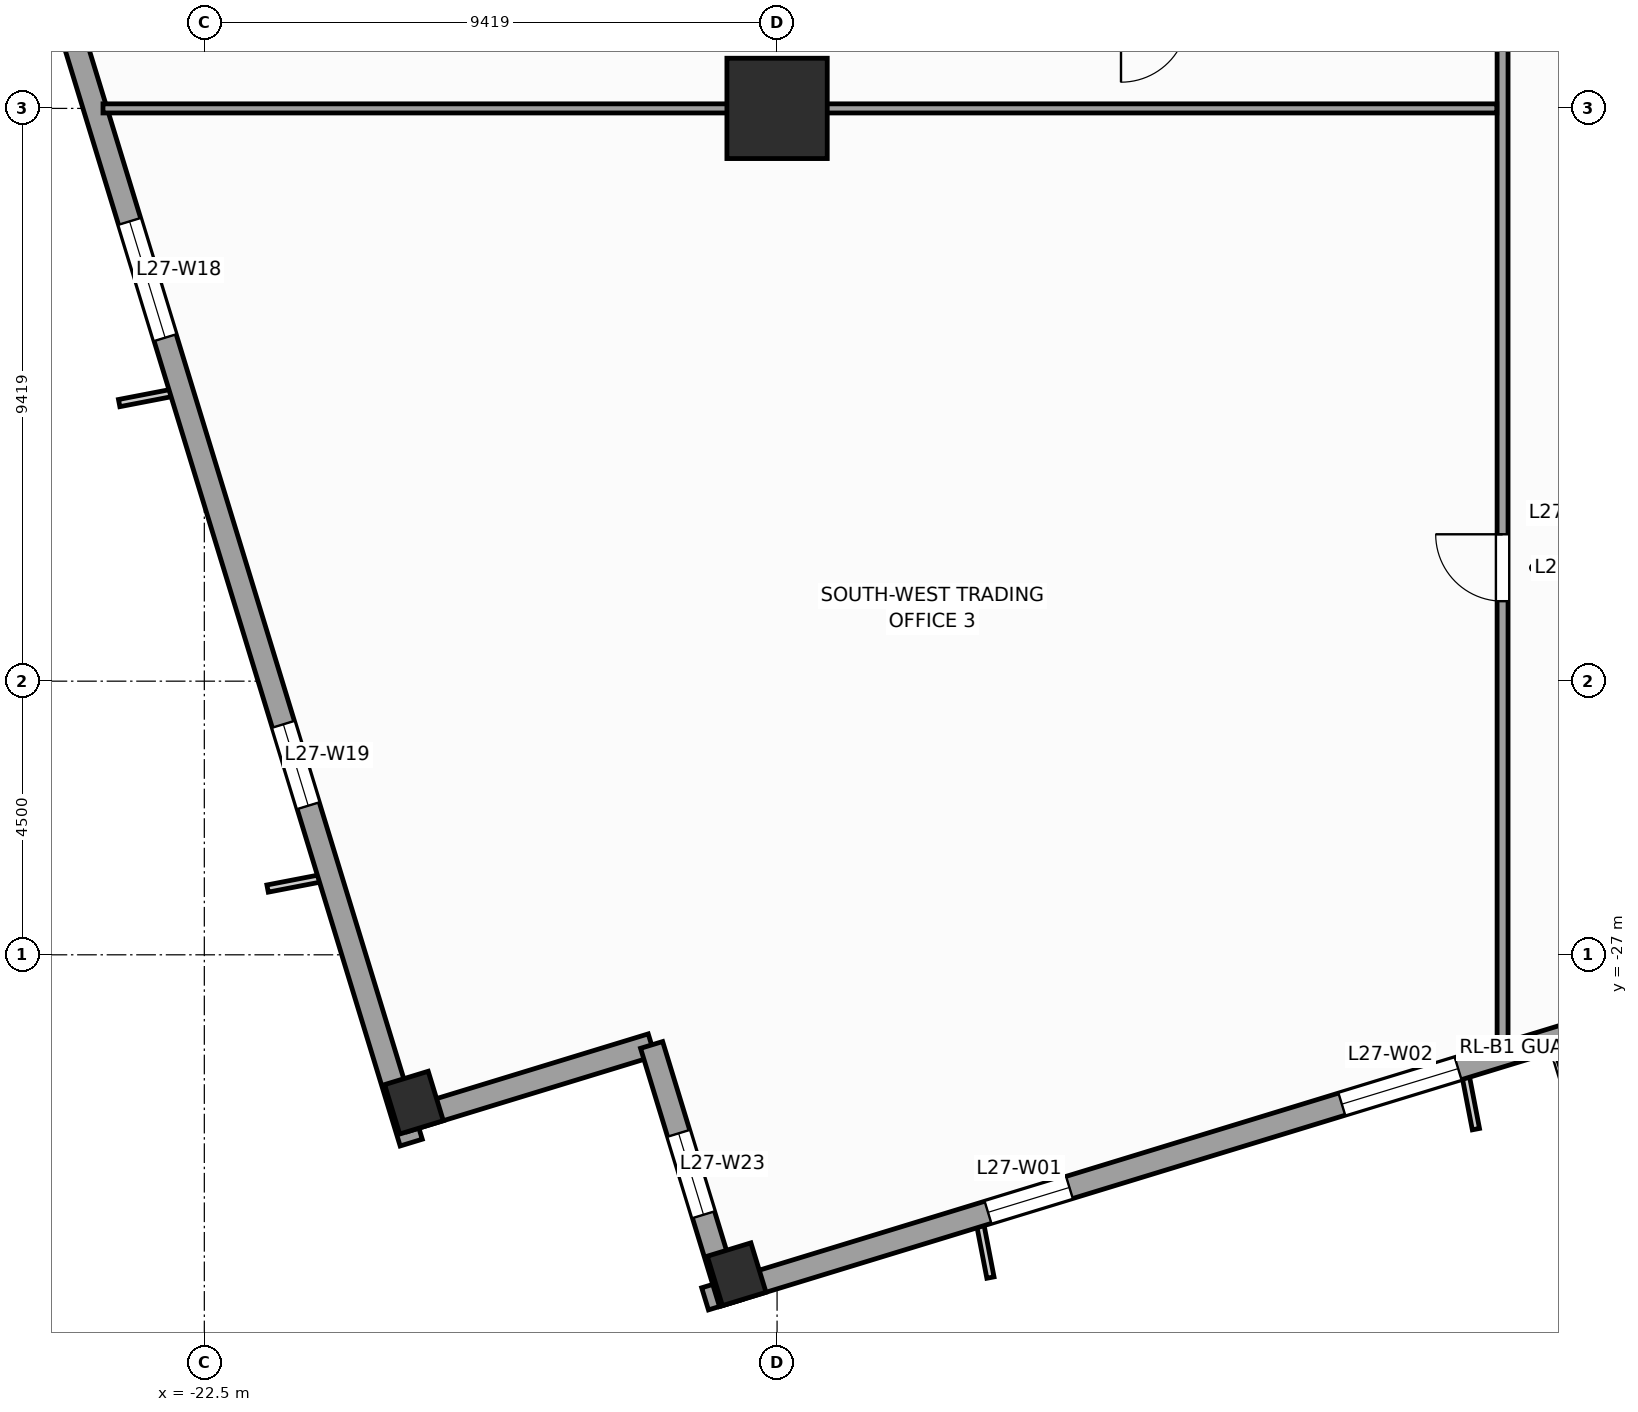
"""IFC4 building model, lengths in metres.
Left out: names, types, materials, properties, quantities, classifications, styles, units other than length and angle.
Written with IfcOpenShell. Run it as: python <this file> out.ifc"""

import sys

from ifc_helpers import new_model, si_unit, direction, frame, frame_2d, origin, origin_2d, place, context, subcontext, project, spatial, rectangle, extrude, source, transform, mapped, element, fill, save


model = new_model("IFC4")
c1 = context("Model", 3, precision=1e-05, world=origin(), true_north=direction((0.0, 1.0)))
c2 = subcontext(c1, "Body", "Model", "MODEL_VIEW")
j1 = project(units=[si_unit("LENGTHUNIT", "METRE"), si_unit("PLANEANGLEUNIT", "RADIAN")], contexts=[c1])
p1 = place(None, origin())
s1 = spatial("IfcSite", under=j1, at=p1, CompositionType="ELEMENT")
p2 = place(p1, origin())
s2 = spatial("IfcBuilding", under=s1, at=p2, CompositionType="ELEMENT")
p3 = place(p2, frame((0.0, 0.0, 115.2)))
s3 = spatial("IfcBuildingStorey", under=s2, at=p3, CompositionType="ELEMENT", Elevation=115.2)
m1 = source(origin(), c2, "Body", "SweptSolid", [
    extrude(rectangle(XDim=1.65, YDim=1.65, at=origin_2d()), origin(), (0.0, 0.0, 1.0), 4.0),
])
p4 = place(p3, frame((-13.081, -13.081, 0.0), z_axis=(0.0, 0.0, 1.0), x_axis=(1.0, 0.0, 0.0)))
e1 = element("IfcColumn", 1, at=p4, inside=s3, PredefinedType="COLUMN", context=c2, shape_type="MappedRepresentation", body=[
    mapped(m1, transform((0.0, 0.0, 0.0), scale=1.0)),
])
m2 = source(origin(), c2, "Body", "SweptSolid", [
    extrude(rectangle(XDim=0.75, YDim=0.85, at=origin_2d()), origin(), (0.0, 0.0, 1.0), 4.0),
])
for number, where, z_axis, x_axis in (
    (2, (-13.746, -32.253, 0.0), (0.0, 0.0, 1.0), (0.956, 0.292, 0.0)),
    (3, (-19.052, -29.431, 0.0), (0.0, 0.0, 1.0), (0.956, 0.292, 0.0)),
):
    element("IfcColumn", number, at=place(p3, frame(where, z_axis=z_axis, x_axis=x_axis)), inside=s3, PredefinedType="COLUMN", context=c2, shape_type="MappedRepresentation", body=[
        mapped(m2, transform((0.0, 0.0, 0.0), scale=1.0)),
    ])
p5 = place(p3, frame((-14.265, -32.658, 0.0), z_axis=(0.0, 0.0, 1.0), x_axis=(0.956304320851, 0.292373127906, 0.0)))
e4 = element("IfcWall", 4, at=p5, inside=s3, PredefinedType="STANDARD", context=c2, shape_type="SweptSolid", body=[
    extrude(rectangle(XDim=46.38, YDim=0.38, at=frame_2d((23.19, 0.0))), origin(), (0.0, 0.0, 1.0), 3.14),
])
p6 = place(p5, frame((17.065, 0.0, 0.0)))
e5 = element("IfcOpeningElement", 5, at=p6, cuts=e4, PredefinedType="OPENING", context=c2, shape_type="SweptSolid", body=[
    extrude(rectangle(XDim=1.05, YDim=2.25, at=frame_2d((0.525, 1.125))), frame((0.0, 0.2, 0.0), z_axis=(0.0, -1.0, 0.0), x_axis=(1.0, 0.0, 0.0)), (0.0, 0.0, 1.0), 0.4),
])
p7 = place(p5, frame((4.865, 0.0, 0.51)))
e6 = element("IfcOpeningElement", 6, at=p7, cuts=e4, PredefinedType="OPENING", context=c2, shape_type="SweptSolid", body=[
    extrude(rectangle(XDim=1.4, YDim=2.4, at=frame_2d((0.7, 1.2))), frame((0.0, 0.2, 0.0), z_axis=(0.0, -1.0, 0.0), x_axis=(1.0, 0.0, 0.0)), (0.0, 0.0, 1.0), 0.4),
])
p8 = place(p5, frame((10.95, 0.0, 0.51)))
e7 = element("IfcOpeningElement", 7, at=p8, cuts=e4, PredefinedType="OPENING", context=c2, shape_type="SweptSolid", body=[
    extrude(rectangle(XDim=2.0, YDim=2.4, at=frame_2d((1.0, 1.2))), frame((0.0, 0.2, 0.0), z_axis=(0.0, -1.0, 0.0), x_axis=(1.0, 0.0, 0.0)), (0.0, 0.0, 1.0), 0.4),
])
p9 = place(p5, frame((20.512, 0.0, 0.51)))
e8 = element("IfcOpeningElement", 8, at=p9, cuts=e4, PredefinedType="OPENING", context=c2, shape_type="SweptSolid", body=[
    extrude(rectangle(XDim=2.0, YDim=2.4, at=frame_2d((1.0, 1.2))), frame((0.0, 0.2, 0.0), z_axis=(0.0, -1.0, 0.0), x_axis=(1.0, 0.0, 0.0)), (0.0, 0.0, 1.0), 0.4),
])
p10 = place(p5, frame((30.538, 0.0, 0.51)))
e9 = element("IfcOpeningElement", 9, at=p10, cuts=e4, PredefinedType="OPENING", context=c2, shape_type="SweptSolid", body=[
    extrude(rectangle(XDim=2.0, YDim=2.4, at=frame_2d((1.0, 1.2))), frame((0.0, 0.2, 0.0), z_axis=(0.0, -1.0, 0.0), x_axis=(1.0, 0.0, 0.0)), (0.0, 0.0, 1.0), 0.4),
])
p11 = place(p5, frame((39.187, 0.0, 0.51)))
e10 = element("IfcOpeningElement", 10, at=p11, cuts=e4, PredefinedType="OPENING", context=c2, shape_type="SweptSolid", body=[
    extrude(rectangle(XDim=1.4, YDim=2.4, at=frame_2d((0.7, 1.2))), frame((0.0, 0.2, 0.0), z_axis=(0.0, -1.0, 0.0), x_axis=(1.0, 0.0, 0.0)), (0.0, 0.0, 1.0), 0.4),
])
p12 = place(p3, frame((-32.658, 14.265, 0.0), z_axis=(0.0, 0.0, 1.0), x_axis=(0.292373127906, -0.956304320851, 0.0)))
e11 = element("IfcWall", 11, at=p12, inside=s3, PredefinedType="STANDARD", context=c2, shape_type="SweptSolid", body=[
    extrude(rectangle(XDim=46.38, YDim=0.38, at=frame_2d((23.19, 0.0))), origin(), (0.0, 0.0, 1.0), 3.14),
])
p13 = place(p12, frame((4.865, 0.0, 0.51)))
e12 = element("IfcOpeningElement", 12, at=p13, cuts=e11, PredefinedType="OPENING", context=c2, shape_type="SweptSolid", body=[
    extrude(rectangle(XDim=1.4, YDim=2.4, at=frame_2d((0.7, 1.2))), frame((0.0, 0.2, 0.0), z_axis=(0.0, -1.0, 0.0), x_axis=(1.0, 0.0, 0.0)), (0.0, 0.0, 1.0), 0.4),
])
p14 = place(p12, frame((14.7, 0.0, 0.51)))
e13 = element("IfcOpeningElement", 13, at=p14, cuts=e11, PredefinedType="OPENING", context=c2, shape_type="SweptSolid", body=[
    extrude(rectangle(XDim=2.0, YDim=2.4, at=frame_2d((1.0, 1.2))), frame((0.0, 0.2, 0.0), z_axis=(0.0, -1.0, 0.0), x_axis=(1.0, 0.0, 0.0)), (0.0, 0.0, 1.0), 0.4),
])
p15 = place(p12, frame((19.012, 0.0, 0.51)))
e14 = element("IfcOpeningElement", 14, at=p15, cuts=e11, PredefinedType="OPENING", context=c2, shape_type="SweptSolid", body=[
    extrude(rectangle(XDim=2.0, YDim=2.4, at=frame_2d((1.0, 1.2))), frame((0.0, 0.2, 0.0), z_axis=(0.0, -1.0, 0.0), x_axis=(1.0, 0.0, 0.0)), (0.0, 0.0, 1.0), 0.4),
])
p16 = place(p12, frame((30.538, 0.0, 0.51)))
e15 = element("IfcOpeningElement", 15, at=p16, cuts=e11, PredefinedType="OPENING", context=c2, shape_type="SweptSolid", body=[
    extrude(rectangle(XDim=2.0, YDim=2.4, at=frame_2d((1.0, 1.2))), frame((0.0, 0.2, 0.0), z_axis=(0.0, -1.0, 0.0), x_axis=(1.0, 0.0, 0.0)), (0.0, 0.0, 1.0), 0.4),
])
p17 = place(p12, frame((39.187, 0.0, 0.51)))
e16 = element("IfcOpeningElement", 16, at=p17, cuts=e11, PredefinedType="OPENING", context=c2, shape_type="SweptSolid", body=[
    extrude(rectangle(XDim=1.4, YDim=2.4, at=frame_2d((0.7, 1.2))), frame((0.0, 0.2, 0.0), z_axis=(0.0, -1.0, 0.0), x_axis=(1.0, 0.0, 0.0)), (0.0, 0.0, 1.0), 0.4),
])
p18 = place(p3, frame((-19.208, -29.725, 0.0), z_axis=(0.0, 0.0, 1.0), x_axis=(0.956312764915, 0.292345507338, 0.0)))
e17 = element("IfcWall", 17, at=p18, inside=s3, PredefinedType="STANDARD", context=c2, shape_type="SweptSolid", body=[
    extrude(rectangle(XDim=4.25, YDim=0.38, at=frame_2d((2.125, 0.0))), origin(), (0.0, 0.0, 1.0), 3.74),
])
p19 = place(p3, frame((-15.144, -28.482, 0.0), z_axis=(0.0, 0.0, 1.0), x_axis=(0.292373601522, -0.956304176051, 0.0)))
e18 = element("IfcWall", 18, at=p19, inside=s3, PredefinedType="STANDARD", context=c2, shape_type="SweptSolid", body=[
    extrude(rectangle(XDim=4.44, YDim=0.38, at=frame_2d((2.22, 0.0))), origin(), (0.0, 0.0, 1.0), 3.04),
])
p20 = place(p19, frame((1.52, 0.0, 0.51)))
e19 = element("IfcOpeningElement", 19, at=p20, cuts=e18, PredefinedType="OPENING", context=c2, shape_type="SweptSolid", body=[
    extrude(rectangle(XDim=1.4, YDim=2.4, at=frame_2d((0.7, 1.2))), frame((0.0, 0.2, 0.0), z_axis=(0.0, -1.0, 0.0), x_axis=(1.0, 0.0, 0.0)), (0.0, 0.0, 1.0), 0.4),
])
p21 = place(p3, frame((-1.15, -28.517, 0.0), z_axis=(0.0, 0.0, 1.0), x_axis=(0.0, 1.0, 0.0)))
e20 = element("IfcWall", 20, at=p21, inside=s3, PredefinedType="PARTITIONING", context=c2, shape_type="SweptSolid", body=[
    extrude(rectangle(XDim=16.867, YDim=0.18, at=frame_2d((8.434, 0.0))), origin(), (0.0, 0.0, 1.0), 3.74),
])
p22 = place(p21, frame((7.333, 0.0, 0.0)))
e21 = element("IfcOpeningElement", 21, at=p22, cuts=e20, PredefinedType="OPENING", context=c2, shape_type="SweptSolid", body=[
    extrude(rectangle(XDim=1.1, YDim=2.2, at=frame_2d((0.55, 1.1))), frame((0.0, 0.1, 0.0), z_axis=(0.0, -1.0, 0.0), x_axis=(1.0, 0.0, 0.0)), (0.0, 0.0, 1.0), 0.2),
])
p23 = place(p3, frame((-24.167, -13.081, 0.0), z_axis=(0.0, 0.0, 1.0), x_axis=(1.0, 0.0, 0.0)))
e22 = element("IfcWall", 22, at=p23, inside=s3, PredefinedType="PARTITIONING", context=c2, shape_type="SweptSolid", body=[
    extrude(rectangle(XDim=22.921, YDim=0.15, at=frame_2d((11.461, 0.0))), origin(), (0.0, 0.0, 1.0), 2.732),
])
m3 = source(origin(), c2, "Body", "SweptSolid", [
    extrude(rectangle(XDim=1.4, YDim=2.4, at=frame_2d((0.7, 1.2))), frame((0.0, 0.03, 0.0), z_axis=(0.0, -1.0, 0.0), x_axis=(1.0, 0.0, 0.0)), (0.0, 0.0, 1.0), 0.06),
])
p24 = place(p7, origin())
e23 = element("IfcWindow", 23, at=p24, inside=s3, PartitioningType="SINGLE_PANEL", PredefinedType="WINDOW", context=c2, shape_type="MappedRepresentation", body=[
    mapped(m3, transform((0.0, 0.0, 0.0), scale=1.0)),
])
fill(e6, e23)
m4 = source(origin(), c2, "Body", "SweptSolid", [
    extrude(rectangle(XDim=2.0, YDim=2.4, at=frame_2d((1.0, 1.2))), frame((0.0, 0.03, 0.0), z_axis=(0.0, -1.0, 0.0), x_axis=(1.0, 0.0, 0.0)), (0.0, 0.0, 1.0), 0.06),
])
p25 = place(p8, origin())
e24 = element("IfcWindow", 24, at=p25, inside=s3, PartitioningType="SINGLE_PANEL", PredefinedType="WINDOW", context=c2, shape_type="MappedRepresentation", body=[
    mapped(m4, transform((0.0, 0.0, 0.0), scale=1.0)),
])
fill(e7, e24)
p26 = place(p16, origin())
e25 = element("IfcWindow", 25, at=p26, inside=s3, PartitioningType="SINGLE_PANEL", PredefinedType="WINDOW", context=c2, shape_type="MappedRepresentation", body=[
    mapped(m4, transform((0.0, 0.0, 0.0), scale=1.0)),
])
fill(e15, e25)
p27 = place(p17, origin())
e26 = element("IfcWindow", 26, at=p27, inside=s3, PartitioningType="SINGLE_PANEL", PredefinedType="WINDOW", context=c2, shape_type="MappedRepresentation", body=[
    mapped(m3, transform((0.0, 0.0, 0.0), scale=1.0)),
])
fill(e16, e26)
p28 = place(p20, origin())
e27 = element("IfcWindow", 27, at=p28, inside=s3, PartitioningType="SINGLE_PANEL", PredefinedType="WINDOW", context=c2, shape_type="MappedRepresentation", body=[
    mapped(m3, transform((0.0, 0.0, 0.0), scale=1.0)),
])
fill(e19, e27)
m5 = source(origin(), c2, "Body", "SweptSolid", [
    extrude(rectangle(XDim=1.1, YDim=2.2, at=frame_2d((0.55, 1.1))), frame((0.0, 0.025, 0.0), z_axis=(0.0, -1.0, 0.0), x_axis=(1.0, 0.0, 0.0)), (0.0, 0.0, 1.0), 0.05),
])
p29 = place(p22, origin())
e28 = element("IfcDoor", 28, at=p29, inside=s3, OperationType="SINGLE_SWING_RIGHT", PredefinedType="DOOR", context=c2, shape_type="MappedRepresentation", body=[
    mapped(m5, transform((0.0, 0.0, 0.0), scale=1.0)),
])
fill(e21, e28)
save(model, sys.argv[1])
